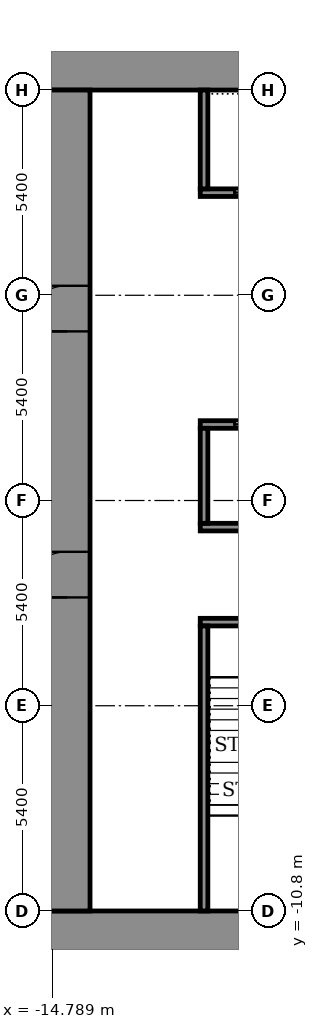
"""IFC4 building model, lengths in metres.
Left out: names, types, materials, properties, quantities, classifications, styles, units other than length and angle.
Written with IfcOpenShell. Run it as: python <this file> out.ifc"""

import sys

from ifc_helpers import new_model, si_unit, direction, frame, frame_2d, origin, place, context, subcontext, project, spatial, rectangle, extrude, element, fill, save


model = new_model("IFC4")
c1 = context("Model", 3, precision=1e-05, world=origin(), true_north=direction((0.0, 1.0)))
c2 = subcontext(c1, "Body", "Model", "MODEL_VIEW")
j1 = project(units=[si_unit("LENGTHUNIT", "METRE"), si_unit("PLANEANGLEUNIT", "RADIAN")], contexts=[c1])
p1 = place(None, origin())
s1 = spatial("IfcSite", under=j1, at=p1, CompositionType="ELEMENT")
p2 = place(p1, origin())
s2 = spatial("IfcBuilding", under=s1, at=p2, CompositionType="ELEMENT")
p3 = place(p2, frame((0.0, 0.0, 25.0)))
s3 = spatial("IfcBuildingStorey", under=s2, at=p3, CompositionType="ELEMENT", Elevation=25.0)
for number, where, z_axis, x_axis in (
    (1, (-15.0, -11.4, 0.0), (0.0, 0.0, 1.0), (1.0, 0.0, 0.0)),
    (2, (-15.0, 11.4, 0.0), (0.0, 0.0, 1.0), (1.0, 0.0, 0.0)),
):
    element("IfcWall", number, at=place(p3, frame(where, z_axis=z_axis, x_axis=x_axis)), inside=s3, PredefinedType="SHEAR", context=c2, shape_type="SweptSolid", body=[
        extrude(rectangle(XDim=30.0, YDim=1.2, at=frame_2d((15.0, 0.0))), origin(), (0.0, 0.0, 1.0), 4.5),
    ])
p4 = place(p3, frame((-14.4, -10.8, 0.0), z_axis=(0.0, 0.0, 1.0), x_axis=(0.0, 1.0, 0.0)))
e3 = element("IfcWall", 3, at=p4, inside=s3, PredefinedType="SHEAR", context=c2, shape_type="SweptSolid", body=[
    extrude(rectangle(XDim=21.6, YDim=1.2, at=frame_2d((10.8, 0.0))), origin(), (0.0, 0.0, 1.0), 4.5),
])
p5 = place(p4, frame((8.25, 0.0, 0.0)))
e4 = element("IfcOpeningElement", 4, at=p5, cuts=e3, PredefinedType="OPENING", context=c2, shape_type="SweptSolid", body=[
    extrude(rectangle(XDim=1.2, YDim=2.1, at=frame_2d((0.6, 1.05))), frame((0.0, 0.61, 0.0), z_axis=(0.0, -1.0, 0.0), x_axis=(1.0, 0.0, 0.0)), (0.0, 0.0, 1.0), 1.22),
])
p6 = place(p4, frame((15.25, 0.0, 0.0)))
e5 = element("IfcOpeningElement", 5, at=p6, cuts=e3, PredefinedType="OPENING", context=c2, shape_type="SweptSolid", body=[
    extrude(rectangle(XDim=1.2, YDim=2.1, at=frame_2d((0.6, 1.05))), frame((0.0, 0.61, 0.0), z_axis=(0.0, -1.0, 0.0), x_axis=(1.0, 0.0, 0.0)), (0.0, 0.0, 1.0), 1.22),
])
p7 = place(p3, frame((-10.9, -3.2, 0.0), z_axis=(0.0, 0.0, 1.0), x_axis=(1.0, 0.0, 0.0)))
e6 = element("IfcWall", 6, at=p7, inside=s3, PredefinedType="SHEAR", context=c2, shape_type="SweptSolid", body=[
    extrude(rectangle(XDim=21.8, YDim=0.2, at=frame_2d((10.9, 0.0))), origin(), (0.0, 0.0, 1.0), 3.95),
])
p8 = place(p7, frame((1.075, 0.0, 0.0)))
e7 = element("IfcOpeningElement", 7, at=p8, cuts=e6, PredefinedType="OPENING", context=c2, shape_type="SweptSolid", body=[
    extrude(rectangle(XDim=1.1, YDim=2.1, at=frame_2d((0.55, 1.05))), frame((0.0, 0.11, 0.0), z_axis=(0.0, -1.0, 0.0), x_axis=(1.0, 0.0, 0.0)), (0.0, 0.0, 1.0), 0.22),
])
p9 = place(p7, frame((10.325, 0.0, 0.0)))
e8 = element("IfcOpeningElement", 8, at=p9, cuts=e6, PredefinedType="OPENING", context=c2, shape_type="SweptSolid", body=[
    extrude(rectangle(XDim=1.1, YDim=2.1, at=frame_2d((0.55, 1.05))), frame((0.0, 0.11, 0.0), z_axis=(0.0, -1.0, 0.0), x_axis=(1.0, 0.0, 0.0)), (0.0, 0.0, 1.0), 0.22),
])
p10 = place(p7, frame((19.625, 0.0, 0.0)))
e9 = element("IfcOpeningElement", 9, at=p10, cuts=e6, PredefinedType="OPENING", context=c2, shape_type="SweptSolid", body=[
    extrude(rectangle(XDim=1.1, YDim=2.1, at=frame_2d((0.55, 1.05))), frame((0.0, 0.11, 0.0), z_axis=(0.0, -1.0, 0.0), x_axis=(1.0, 0.0, 0.0)), (0.0, 0.0, 1.0), 0.22),
])
p11 = place(p7, frame((5.7, 0.0, 0.0)))
e10 = element("IfcOpeningElement", 10, at=p11, cuts=e6, PredefinedType="OPENING", context=c2, shape_type="SweptSolid", body=[
    extrude(rectangle(XDim=1.1, YDim=2.1, at=frame_2d((0.55, 1.05))), frame((0.0, 0.11, 0.0), z_axis=(0.0, -1.0, 0.0), x_axis=(1.0, 0.0, 0.0)), (0.0, 0.0, 1.0), 0.22),
])
p12 = place(p7, frame((14.975, 0.0, 0.0)))
e11 = element("IfcOpeningElement", 11, at=p12, cuts=e6, PredefinedType="OPENING", context=c2, shape_type="SweptSolid", body=[
    extrude(rectangle(XDim=1.1, YDim=2.1, at=frame_2d((0.55, 1.05))), frame((0.0, 0.11, 0.0), z_axis=(0.0, -1.0, 0.0), x_axis=(1.0, 0.0, 0.0)), (0.0, 0.0, 1.0), 0.22),
])
p13 = place(p3, frame((-10.9, -0.7, 0.0), z_axis=(0.0, 0.0, 1.0), x_axis=(1.0, 0.0, 0.0)))
e12 = element("IfcWall", 12, at=p13, inside=s3, PredefinedType="SHEAR", context=c2, shape_type="SweptSolid", body=[
    extrude(rectangle(XDim=21.8, YDim=0.2, at=frame_2d((10.9, 0.0))), origin(), (0.0, 0.0, 1.0), 3.95),
])
p14 = place(p3, frame((-10.9, 2.0, 0.0), z_axis=(0.0, 0.0, 1.0), x_axis=(1.0, 0.0, 0.0)))
e13 = element("IfcWall", 13, at=p14, inside=s3, PredefinedType="SHEAR", context=c2, shape_type="SweptSolid", body=[
    extrude(rectangle(XDim=21.8, YDim=0.2, at=frame_2d((10.9, 0.0))), origin(), (0.0, 0.0, 1.0), 3.95),
])
p15 = place(p14, frame((0.9, 0.0, 0.0)))
e14 = element("IfcOpeningElement", 14, at=p15, cuts=e13, PredefinedType="OPENING", context=c2, shape_type="SweptSolid", body=[
    extrude(rectangle(XDim=1.1, YDim=2.1, at=frame_2d((0.55, 1.05))), frame((0.0, 0.11, 0.0), z_axis=(0.0, -1.0, 0.0), x_axis=(1.0, 0.0, 0.0)), (0.0, 0.0, 1.0), 0.22),
])
p16 = place(p14, frame((3.6, 0.0, 0.0)))
e15 = element("IfcOpeningElement", 15, at=p16, cuts=e13, PredefinedType="OPENING", context=c2, shape_type="SweptSolid", body=[
    extrude(rectangle(XDim=1.1, YDim=2.1, at=frame_2d((0.55, 1.05))), frame((0.0, 0.11, 0.0), z_axis=(0.0, -1.0, 0.0), x_axis=(1.0, 0.0, 0.0)), (0.0, 0.0, 1.0), 0.22),
])
p17 = place(p14, frame((6.3, 0.0, 0.0)))
e16 = element("IfcOpeningElement", 16, at=p17, cuts=e13, PredefinedType="OPENING", context=c2, shape_type="SweptSolid", body=[
    extrude(rectangle(XDim=1.1, YDim=2.1, at=frame_2d((0.55, 1.05))), frame((0.0, 0.11, 0.0), z_axis=(0.0, -1.0, 0.0), x_axis=(1.0, 0.0, 0.0)), (0.0, 0.0, 1.0), 0.22),
])
p18 = place(p14, frame((9.0, 0.0, 0.0)))
e17 = element("IfcOpeningElement", 17, at=p18, cuts=e13, PredefinedType="OPENING", context=c2, shape_type="SweptSolid", body=[
    extrude(rectangle(XDim=1.1, YDim=2.1, at=frame_2d((0.55, 1.05))), frame((0.0, 0.11, 0.0), z_axis=(0.0, -1.0, 0.0), x_axis=(1.0, 0.0, 0.0)), (0.0, 0.0, 1.0), 0.22),
])
p19 = place(p14, frame((11.7, 0.0, 0.0)))
e18 = element("IfcOpeningElement", 18, at=p19, cuts=e13, PredefinedType="OPENING", context=c2, shape_type="SweptSolid", body=[
    extrude(rectangle(XDim=1.1, YDim=2.1, at=frame_2d((0.55, 1.05))), frame((0.0, 0.11, 0.0), z_axis=(0.0, -1.0, 0.0), x_axis=(1.0, 0.0, 0.0)), (0.0, 0.0, 1.0), 0.22),
])
p20 = place(p14, frame((14.5, 0.0, 0.0)))
e19 = element("IfcOpeningElement", 19, at=p20, cuts=e13, PredefinedType="OPENING", context=c2, shape_type="SweptSolid", body=[
    extrude(rectangle(XDim=0.9, YDim=2.1, at=frame_2d((0.45, 1.05))), frame((0.0, 0.11, 0.0), z_axis=(0.0, -1.0, 0.0), x_axis=(1.0, 0.0, 0.0)), (0.0, 0.0, 1.0), 0.22),
])
p21 = place(p14, frame((18.55, 0.0, 0.0)))
e20 = element("IfcOpeningElement", 20, at=p21, cuts=e13, PredefinedType="OPENING", context=c2, shape_type="SweptSolid", body=[
    extrude(rectangle(XDim=0.9, YDim=2.1, at=frame_2d((0.45, 1.05))), frame((0.0, 0.11, 0.0), z_axis=(0.0, -1.0, 0.0), x_axis=(1.0, 0.0, 0.0)), (0.0, 0.0, 1.0), 0.22),
])
p22 = place(p3, frame((-10.9, 8.1, 0.0), z_axis=(0.0, 0.0, 1.0), x_axis=(1.0, 0.0, 0.0)))
e21 = element("IfcWall", 21, at=p22, inside=s3, PredefinedType="SHEAR", context=c2, shape_type="SweptSolid", body=[
    extrude(rectangle(XDim=21.8, YDim=0.2, at=frame_2d((10.9, 0.0))), origin(), (0.0, 0.0, 1.0), 3.95),
])
p23 = place(p22, frame((0.9, 0.0, 0.0)))
e22 = element("IfcOpeningElement", 22, at=p23, cuts=e21, PredefinedType="OPENING", context=c2, shape_type="SweptSolid", body=[
    extrude(rectangle(XDim=1.1, YDim=2.1, at=frame_2d((0.55, 1.05))), frame((0.0, 0.11, 0.0), z_axis=(0.0, -1.0, 0.0), x_axis=(1.0, 0.0, 0.0)), (0.0, 0.0, 1.0), 0.22),
])
p24 = place(p22, frame((3.6, 0.0, 0.0)))
e23 = element("IfcOpeningElement", 23, at=p24, cuts=e21, PredefinedType="OPENING", context=c2, shape_type="SweptSolid", body=[
    extrude(rectangle(XDim=1.1, YDim=2.1, at=frame_2d((0.55, 1.05))), frame((0.0, 0.11, 0.0), z_axis=(0.0, -1.0, 0.0), x_axis=(1.0, 0.0, 0.0)), (0.0, 0.0, 1.0), 0.22),
])
p25 = place(p22, frame((6.3, 0.0, 0.0)))
e24 = element("IfcOpeningElement", 24, at=p25, cuts=e21, PredefinedType="OPENING", context=c2, shape_type="SweptSolid", body=[
    extrude(rectangle(XDim=1.1, YDim=2.1, at=frame_2d((0.55, 1.05))), frame((0.0, 0.11, 0.0), z_axis=(0.0, -1.0, 0.0), x_axis=(1.0, 0.0, 0.0)), (0.0, 0.0, 1.0), 0.22),
])
p26 = place(p22, frame((9.0, 0.0, 0.0)))
e25 = element("IfcOpeningElement", 25, at=p26, cuts=e21, PredefinedType="OPENING", context=c2, shape_type="SweptSolid", body=[
    extrude(rectangle(XDim=1.1, YDim=2.1, at=frame_2d((0.55, 1.05))), frame((0.0, 0.11, 0.0), z_axis=(0.0, -1.0, 0.0), x_axis=(1.0, 0.0, 0.0)), (0.0, 0.0, 1.0), 0.22),
])
p27 = place(p22, frame((11.7, 0.0, 0.0)))
e26 = element("IfcOpeningElement", 26, at=p27, cuts=e21, PredefinedType="OPENING", context=c2, shape_type="SweptSolid", body=[
    extrude(rectangle(XDim=1.1, YDim=2.1, at=frame_2d((0.55, 1.05))), frame((0.0, 0.11, 0.0), z_axis=(0.0, -1.0, 0.0), x_axis=(1.0, 0.0, 0.0)), (0.0, 0.0, 1.0), 0.22),
])
p28 = place(p22, frame((14.5, 0.0, 0.0)))
e27 = element("IfcOpeningElement", 27, at=p28, cuts=e21, PredefinedType="OPENING", context=c2, shape_type="SweptSolid", body=[
    extrude(rectangle(XDim=0.9, YDim=2.1, at=frame_2d((0.45, 1.05))), frame((0.0, 0.11, 0.0), z_axis=(0.0, -1.0, 0.0), x_axis=(1.0, 0.0, 0.0)), (0.0, 0.0, 1.0), 0.22),
])
p29 = place(p22, frame((18.55, 0.0, 0.0)))
e28 = element("IfcOpeningElement", 28, at=p29, cuts=e21, PredefinedType="OPENING", context=c2, shape_type="SweptSolid", body=[
    extrude(rectangle(XDim=0.9, YDim=2.1, at=frame_2d((0.45, 1.05))), frame((0.0, 0.11, 0.0), z_axis=(0.0, -1.0, 0.0), x_axis=(1.0, 0.0, 0.0)), (0.0, 0.0, 1.0), 0.22),
])
p30 = place(p3, frame((-10.8, -10.8, 0.0), z_axis=(0.0, 0.0, 1.0), x_axis=(0.0, 1.0, 0.0)))
e29 = element("IfcWall", 29, at=p30, inside=s3, PredefinedType="SHEAR", context=c2, shape_type="SweptSolid", body=[
    extrude(rectangle(XDim=7.5, YDim=0.2, at=frame_2d((3.75, 0.0))), origin(), (0.0, 0.0, 1.0), 3.95),
])
p31 = place(p3, frame((-10.8, -0.6, 0.0), z_axis=(0.0, 0.0, 1.0), x_axis=(0.0, 1.0, 0.0)))
e30 = element("IfcWall", 30, at=p31, inside=s3, PredefinedType="SHEAR", context=c2, shape_type="SweptSolid", body=[
    extrude(rectangle(XDim=2.5, YDim=0.2, at=frame_2d((1.25, 0.0))), origin(), (0.0, 0.0, 1.0), 3.95),
])
p32 = place(p3, frame((-10.8, 8.2, 0.0), z_axis=(0.0, 0.0, 1.0), x_axis=(0.0, 1.0, 0.0)))
e31 = element("IfcWall", 31, at=p32, inside=s3, PredefinedType="SHEAR", context=c2, shape_type="SweptSolid", body=[
    extrude(rectangle(XDim=2.6, YDim=0.2, at=frame_2d((1.3, 0.0))), origin(), (0.0, 0.0, 1.0), 3.95),
])
p33 = place(p5, origin())
e32 = element("IfcDoor", 32, at=p33, inside=s3, OperationType="DOUBLE_DOOR_SINGLE_SWING", PredefinedType="DOOR", context=c2, shape_type="SweptSolid", body=[
    extrude(rectangle(XDim=1.2, YDim=2.1, at=frame_2d((0.6, 1.05))), frame((0.0, 0.025, 0.0), z_axis=(0.0, -1.0, 0.0), x_axis=(1.0, 0.0, 0.0)), (0.0, 0.0, 1.0), 0.05),
])
fill(e4, e32)
p34 = place(p6, origin())
e33 = element("IfcDoor", 33, at=p34, inside=s3, OperationType="DOUBLE_DOOR_SINGLE_SWING", PredefinedType="DOOR", context=c2, shape_type="SweptSolid", body=[
    extrude(rectangle(XDim=1.2, YDim=2.1, at=frame_2d((0.6, 1.05))), frame((0.0, 0.025, 0.0), z_axis=(0.0, -1.0, 0.0), x_axis=(1.0, 0.0, 0.0)), (0.0, 0.0, 1.0), 0.05),
])
fill(e5, e33)
p35 = place(p15, origin())
e34 = element("IfcDoor", 34, at=p35, inside=s3, OperationType="SLIDING_TO_LEFT", PredefinedType="DOOR", context=c2, shape_type="SweptSolid", body=[
    extrude(rectangle(XDim=1.1, YDim=2.1, at=frame_2d((0.55, 1.05))), frame((0.0, 0.025, 0.0), z_axis=(0.0, -1.0, 0.0), x_axis=(1.0, 0.0, 0.0)), (0.0, 0.0, 1.0), 0.05),
])
fill(e14, e34)
p36 = place(p23, origin())
e35 = element("IfcDoor", 35, at=p36, inside=s3, OperationType="SLIDING_TO_LEFT", PredefinedType="DOOR", context=c2, shape_type="SweptSolid", body=[
    extrude(rectangle(XDim=1.1, YDim=2.1, at=frame_2d((0.55, 1.05))), frame((0.0, 0.025, 0.0), z_axis=(0.0, -1.0, 0.0), x_axis=(1.0, 0.0, 0.0)), (0.0, 0.0, 1.0), 0.05),
])
fill(e22, e35)
save(model, sys.argv[1])
